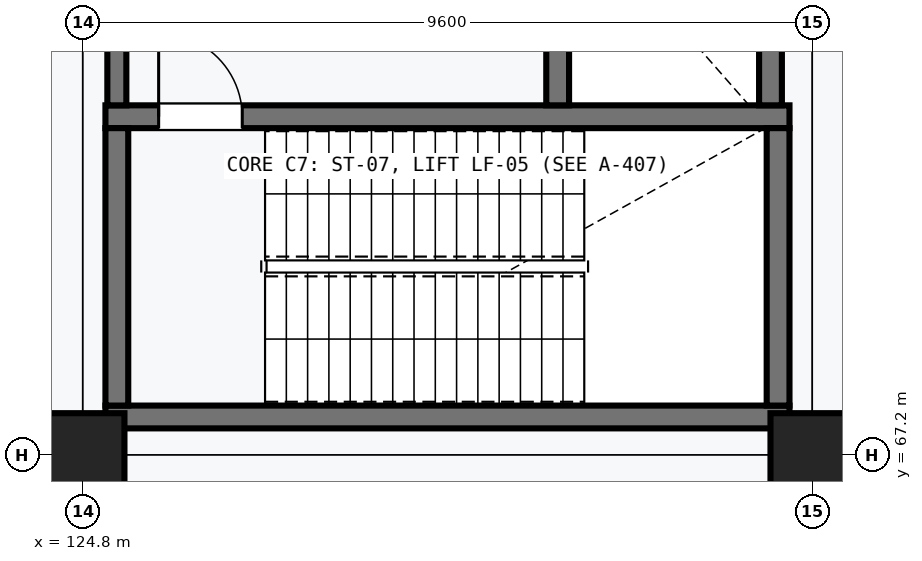
"""IFC4 building model, lengths in metres.
Left out: names, types, materials, properties, quantities, classifications, styles, units other than length and angle.
Written with IfcOpenShell. Run it as: python <this file> out.ifc"""

import sys

from ifc_helpers import new_model, si_unit, direction, frame, frame_2d, origin, origin_2d, place, context, subcontext, project, spatial, rectangle, extrude, element, fill, save


model = new_model("IFC4")
c1 = context("Model", 3, precision=1e-05, world=origin(), true_north=direction((0.0, 1.0)))
c2 = subcontext(c1, "Body", "Model", "MODEL_VIEW")
j1 = project(units=[si_unit("LENGTHUNIT", "METRE"), si_unit("PLANEANGLEUNIT", "RADIAN")], contexts=[c1])
p1 = place(None, origin())
s1 = spatial("IfcSite", under=j1, at=p1, CompositionType="ELEMENT")
p2 = place(p1, origin())
s2 = spatial("IfcBuilding", under=s1, at=p2, CompositionType="ELEMENT")
p3 = place(p2, frame((0.0, 0.0, -5.4)))
s3 = spatial("IfcBuildingStorey", under=s2, at=p3, CompositionType="ELEMENT", Elevation=-5.4)
for number, where, z_axis, x_axis in (
    (1, (124.8, 67.2, 0.0), (0.0, 0.0, 1.0), (1.0, 0.0, 0.0)),
    (2, (134.4, 67.2, 0.0), (0.0, 0.0, 1.0), (1.0, 0.0, 0.0)),
):
    element("IfcColumn", number, at=place(p3, frame(where, z_axis=z_axis, x_axis=x_axis)), inside=s3, PredefinedType="COLUMN", context=c2, shape_type="SweptSolid", body=[
        extrude(rectangle(XDim=1.1, YDim=1.1, at=origin_2d()), origin(), (0.0, 0.0, 1.0), 5.0),
    ])
p4 = place(p3, frame((125.1, 67.7, 0.0), z_axis=(0.0, 0.0, 1.0), x_axis=(1.0, 0.0, 0.0)))
e3 = element("IfcWall", 3, at=p4, inside=s3, PredefinedType="SHEAR", context=c2, shape_type="SweptSolid", body=[
    extrude(rectangle(XDim=9.0, YDim=0.3, at=frame_2d((4.5, 0.0))), origin(), (0.0, 0.0, 1.0), 5.0),
])
p5 = place(p3, frame((134.1, 71.65, 0.0), z_axis=(0.0, 0.0, 1.0), x_axis=(-1.0, 0.0, 0.0)))
e4 = element("IfcWall", 4, at=p5, inside=s3, PredefinedType="SHEAR", context=c2, shape_type="SweptSolid", body=[
    extrude(rectangle(XDim=9.0, YDim=0.3, at=frame_2d((4.5, 0.0))), origin(), (0.0, 0.0, 1.0), 5.0),
])
p6 = place(p5, frame((7.2, 0.0, 0.0)))
e5 = element("IfcOpeningElement", 5, at=p6, cuts=e4, PredefinedType="OPENING", context=c2, shape_type="SweptSolid", body=[
    extrude(rectangle(XDim=1.1, YDim=2.15, at=frame_2d((0.55, 1.075))), frame((0.0, 0.16, 0.0), z_axis=(0.0, -1.0, 0.0), x_axis=(1.0, 0.0, 0.0)), (0.0, 0.0, 1.0), 0.32),
])
for number, where, z_axis, x_axis in (
    (6, (125.25, 67.85, 0.0), (0.0, 0.0, 1.0), (0.0, 1.0, 0.0)),
    (7, (133.95, 71.5, 0.0), (0.0, 0.0, 1.0), (0.0, -1.0, 0.0)),
):
    element("IfcWall", number, at=place(p3, frame(where, z_axis=z_axis, x_axis=x_axis)), inside=s3, PredefinedType="SHEAR", context=c2, shape_type="SweptSolid", body=[
        extrude(rectangle(XDim=3.65, YDim=0.3, at=frame_2d((1.825, 0.0))), origin(), (0.0, 0.0, 1.0), 5.0),
    ])
p7 = place(p3, frame((131.05, 74.5, 0.0), z_axis=(0.0, 0.0, 1.0), x_axis=(0.0, -1.0, 0.0)))
e8 = element("IfcWall", 8, at=p7, inside=s3, PredefinedType="SHEAR", context=c2, shape_type="SweptSolid", body=[
    extrude(rectangle(XDim=2.7, YDim=0.3, at=frame_2d((1.35, 0.0))), origin(), (0.0, 0.0, 1.0), 5.0),
])
p8 = place(p7, frame((0.74, 0.0, 0.0)))
e9 = element("IfcOpeningElement", 9, at=p8, cuts=e8, PredefinedType="OPENING", context=c2, shape_type="SweptSolid", body=[
    extrude(rectangle(XDim=1.22, YDim=2.15, at=frame_2d((0.61, 1.075))), frame((0.0, 0.16, 0.0), z_axis=(0.0, -1.0, 0.0), x_axis=(1.0, 0.0, 0.0)), (0.0, 0.0, 1.0), 0.32),
])
p9 = place(p3, frame((133.85, 71.8, 0.0), z_axis=(0.0, 0.0, 1.0), x_axis=(0.0, 1.0, 0.0)))
e10 = element("IfcWall", 10, at=p9, inside=s3, PredefinedType="SHEAR", context=c2, shape_type="SweptSolid", body=[
    extrude(rectangle(XDim=2.7, YDim=0.3, at=frame_2d((1.35, 0.0))), origin(), (0.0, 0.0, 1.0), 5.0),
])
p10 = place(p3, frame((125.25, 71.8, 0.0), z_axis=(0.0, 0.0, 1.0), x_axis=(0.0, 1.0, 0.0)))
e11 = element("IfcWall", 11, at=p10, inside=s3, PredefinedType="SHEAR", context=c2, shape_type="SweptSolid", body=[
    extrude(rectangle(XDim=2.7, YDim=0.25, at=frame_2d((1.35, 0.0))), origin(), (0.0, 0.0, 1.0), 5.0),
])
p11 = place(p10, frame((0.75, 0.0, 0.0)))
e12 = element("IfcOpeningElement", 12, at=p11, cuts=e11, PredefinedType="OPENING", context=c2, shape_type="SweptSolid", body=[
    extrude(rectangle(XDim=1.2, YDim=2.15, at=frame_2d((0.6, 1.075))), frame((0.0, 0.135, 0.0), z_axis=(0.0, -1.0, 0.0), x_axis=(1.0, 0.0, 0.0)), (0.0, 0.0, 1.0), 0.27),
])
p12 = place(p6, frame((1.1, 0.0, 0.0), z_axis=(0.0, 0.0, 1.0), x_axis=(-1.0, 0.0, 0.0)))
e13 = element("IfcDoor", 13, at=p12, inside=s3, OperationType="SINGLE_SWING_RIGHT", PredefinedType="DOOR", context=c2, shape_type="SweptSolid", body=[
    extrude(rectangle(XDim=1.1, YDim=2.15, at=frame_2d((0.55, 1.075))), frame((0.0, 0.025, 0.0), z_axis=(0.0, -1.0, 0.0), x_axis=(1.0, 0.0, 0.0)), (0.0, 0.0, 1.0), 0.05),
])
fill(e5, e13)
save(model, sys.argv[1])
